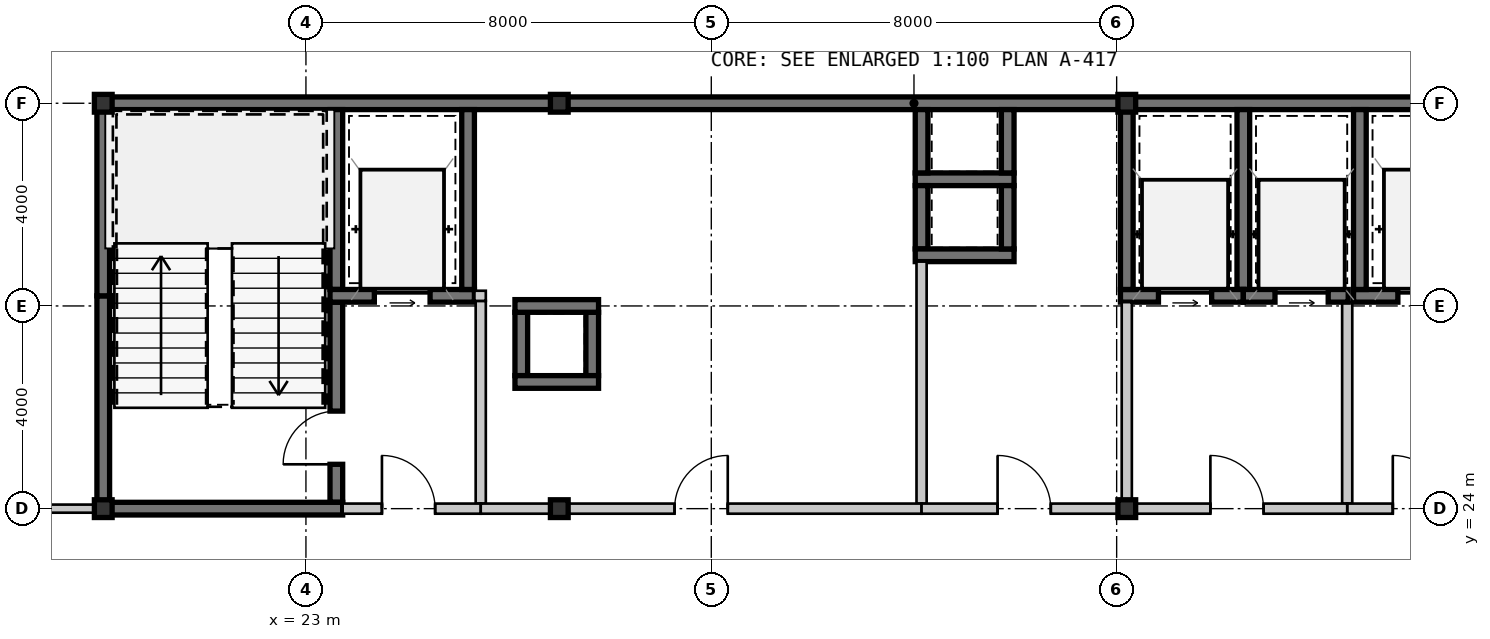
"""IFC4 building model, lengths in metres.
Left out: names, types, materials, properties, quantities, classifications, styles, units other than length and angle.
Written with IfcOpenShell. Run it as: python <this file> out.ifc"""

import sys

from ifc_helpers import new_model, si_unit, direction, frame, frame_2d, origin, origin_2d, place, context, subcontext, project, spatial, rectangle, hollow_rectangle, extrude, source, transform, mapped, element, fill, save


model = new_model("IFC4")
c1 = context("Model", 3, precision=1e-05, world=origin(), true_north=direction((0.0, 1.0)))
c2 = subcontext(c1, "Body", "Model", "MODEL_VIEW")
j1 = project(units=[si_unit("LENGTHUNIT", "METRE"), si_unit("PLANEANGLEUNIT", "RADIAN")], contexts=[c1])
p1 = place(None, origin())
s1 = spatial("IfcSite", under=j1, at=p1, CompositionType="ELEMENT")
p2 = place(p1, origin())
s2 = spatial("IfcBuilding", under=s1, at=p2, CompositionType="ELEMENT")
p3 = place(p2, frame((0.0, 0.0, 168.7)))
s3 = spatial("IfcBuildingStorey", under=s2, at=p3, CompositionType="ELEMENT", Elevation=168.7)
m1 = source(origin(), c2, "Body", "SweptSolid", [
    extrude(hollow_rectangle(XDim=0.35, YDim=0.35, WallThickness=0.016, at=origin_2d()), origin(), (0.0, 0.0, 1.0), 3.85),
])
for number, where, z_axis, x_axis in (
    (1, (19.0, 24.0, 0.0), (0.0, 0.0, 1.0), (1.0, 0.0, 0.0)),
    (2, (28.0, 24.0, 0.0), (0.0, 0.0, 1.0), (1.0, 0.0, 0.0)),
    (3, (39.2, 24.0, 0.0), (0.0, 0.0, 1.0), (1.0, 0.0, 0.0)),
    (4, (19.0, 32.0, 0.0), (0.0, 0.0, 1.0), (1.0, 0.0, 0.0)),
    (5, (28.0, 32.0, 0.0), (0.0, 0.0, 1.0), (1.0, 0.0, 0.0)),
    (6, (39.2, 32.0, 0.0), (0.0, 0.0, 1.0), (1.0, 0.0, 0.0)),
):
    element("IfcColumn", number, at=place(p3, frame(where, z_axis=z_axis, x_axis=x_axis)), inside=s3, PredefinedType="COLUMN", context=c2, shape_type="MappedRepresentation", body=[
        mapped(m1, transform((0.0, 0.0, 0.0), scale=1.0)),
    ])
m2 = source(origin(), c2, "Body", "SweptSolid", [
    extrude(rectangle(XDim=9.125, YDim=0.25, at=frame_2d((4.562, 0.0))), origin(), (0.0, 0.0, 1.0), 3.63),
])
p4 = place(p3, frame((18.875, 32.0, 0.0), z_axis=(0.0, 0.0, 1.0), x_axis=(1.0, 0.0, 0.0)))
e7 = element("IfcWall", 7, at=p4, inside=s3, PredefinedType="SHEAR", context=c2, shape_type="MappedRepresentation", body=[
    mapped(m2, transform((0.0, 0.0, 0.0), scale=1.0)),
])
m3 = source(origin(), c2, "Body", "SweptSolid", [
    extrude(rectangle(XDim=11.2, YDim=0.25, at=frame_2d((5.6, 0.0))), origin(), (0.0, 0.0, 1.0), 3.63),
])
p5 = place(p3, frame((28.0, 32.0, 0.0), z_axis=(0.0, 0.0, 1.0), x_axis=(1.0, 0.0, 0.0)))
e8 = element("IfcWall", 8, at=p5, inside=s3, PredefinedType="SHEAR", context=c2, shape_type="MappedRepresentation", body=[
    mapped(m3, transform((0.0, 0.0, 0.0), scale=1.0)),
])
m4 = source(origin(), c2, "Body", "SweptSolid", [
    extrude(rectangle(XDim=11.925, YDim=0.25, at=frame_2d((5.962, 0.0))), origin(), (0.0, 0.0, 1.0), 3.63),
])
p6 = place(p3, frame((39.2, 32.0, 0.0), z_axis=(0.0, 0.0, 1.0), x_axis=(1.0, 0.0, 0.0)))
e9 = element("IfcWall", 9, at=p6, inside=s3, PredefinedType="SHEAR", context=c2, shape_type="MappedRepresentation", body=[
    mapped(m4, transform((0.0, 0.0, 0.0), scale=1.0)),
])
m5 = source(origin(), c2, "Body", "SweptSolid", [
    extrude(rectangle(XDim=4.075, YDim=0.25, at=frame_2d((2.038, 0.0))), origin(), (0.0, 0.0, 1.0), 3.63),
])
p7 = place(p3, frame((19.0, 24.125, 0.0), z_axis=(0.0, 0.0, 1.0), x_axis=(0.0, 1.0, 0.0)))
e10 = element("IfcWall", 10, at=p7, inside=s3, PredefinedType="SHEAR", context=c2, shape_type="MappedRepresentation", body=[
    mapped(m5, transform((0.0, 0.0, 0.0), scale=1.0)),
])
m6 = source(origin(), c2, "Body", "SweptSolid", [
    extrude(rectangle(XDim=3.675, YDim=0.25, at=frame_2d((1.837, 0.0))), origin(), (0.0, 0.0, 1.0), 3.63),
])
p8 = place(p3, frame((19.0, 28.2, 0.0), z_axis=(0.0, 0.0, 1.0), x_axis=(0.0, 1.0, 0.0)))
e11 = element("IfcWall", 11, at=p8, inside=s3, PredefinedType="SHEAR", context=c2, shape_type="MappedRepresentation", body=[
    mapped(m6, transform((0.0, 0.0, 0.0), scale=1.0)),
])
m7 = source(origin(), c2, "Body", "SweptSolid", [
    extrude(rectangle(XDim=3.55, YDim=0.25, at=frame_2d((1.775, 0.0))), origin(), (0.0, 0.0, 1.0), 3.63),
])
p9 = place(p3, frame((23.6, 28.325, 0.0), z_axis=(0.0, 0.0, 1.0), x_axis=(0.0, 1.0, 0.0)))
e12 = element("IfcWall", 12, at=p9, inside=s3, PredefinedType="SHEAR", context=c2, shape_type="MappedRepresentation", body=[
    mapped(m7, transform((0.0, 0.0, 0.0), scale=1.0)),
])
m8 = source(origin(), c2, "Body", "SweptSolid", [
    extrude(rectangle(XDim=3.95, YDim=0.25, at=frame_2d((1.975, 0.0))), origin(), (0.0, 0.0, 1.0), 3.63),
])
p10 = place(p3, frame((23.6, 24.125, 0.0), z_axis=(0.0, 0.0, 1.0), x_axis=(0.0, 1.0, 0.0)))
e13 = element("IfcWall", 13, at=p10, inside=s3, PredefinedType="SHEAR", context=c2, shape_type="MappedRepresentation", body=[
    mapped(m8, transform((0.0, 0.0, 0.0), scale=1.0)),
])
m9 = source(origin(), c2, "Body", "SweptSolid", [
    extrude(rectangle(XDim=1.05, YDim=2.1, at=frame_2d((0.525, 1.05))), frame((0.0, 0.135, 0.0), z_axis=(0.0, -1.0, 0.0), x_axis=(1.0, 0.0, 0.0)), (0.0, 0.0, 1.0), 0.27),
])
p11 = place(p10, frame((0.75, 0.0, 0.0)))
e14 = element("IfcOpeningElement", 14, at=p11, cuts=e13, PredefinedType="OPENING", context=c2, shape_type="MappedRepresentation", body=[
    mapped(m9, transform((0.0, 0.0, 0.0), scale=1.0)),
])
m10 = source(origin(), c2, "Body", "SweptSolid", [
    extrude(rectangle(XDim=4.85, YDim=0.25, at=frame_2d((2.425, 0.0))), origin(), (0.0, 0.0, 1.0), 3.63),
])
p12 = place(p3, frame((18.875, 24.0, 0.0), z_axis=(0.0, 0.0, 1.0), x_axis=(1.0, 0.0, 0.0)))
e15 = element("IfcWall", 15, at=p12, inside=s3, PredefinedType="SHEAR", context=c2, shape_type="MappedRepresentation", body=[
    mapped(m10, transform((0.0, 0.0, 0.0), scale=1.0)),
])
m11 = source(origin(), c2, "Body", "SweptSolid", [
    extrude(rectangle(XDim=2.85, YDim=0.25, at=frame_2d((1.425, 0.0))), origin(), (0.0, 0.0, 1.0), 3.63),
])
p13 = place(p3, frame((23.475, 28.2, 0.0), z_axis=(0.0, 0.0, 1.0), x_axis=(1.0, 0.0, 0.0)))
e16 = element("IfcWall", 16, at=p13, inside=s3, PredefinedType="SHEAR", context=c2, shape_type="MappedRepresentation", body=[
    mapped(m11, transform((0.0, 0.0, 0.0), scale=1.0)),
])
m12 = source(origin(), c2, "Body", "SweptSolid", [
    extrude(rectangle(XDim=1.1, YDim=2.15, at=frame_2d((0.55, 1.075))), frame((0.0, 0.135, 0.0), z_axis=(0.0, -1.0, 0.0), x_axis=(1.0, 0.0, 0.0)), (0.0, 0.0, 1.0), 0.27),
])
p14 = place(p13, frame((0.875, 0.0, 0.0)))
e17 = element("IfcOpeningElement", 17, at=p14, cuts=e16, PredefinedType="OPENING", context=c2, shape_type="MappedRepresentation", body=[
    mapped(m12, transform((0.0, 0.0, 0.0), scale=1.0)),
])
p15 = place(p3, frame((26.2, 28.325, 0.0), z_axis=(0.0, 0.0, 1.0), x_axis=(0.0, 1.0, 0.0)))
e18 = element("IfcWall", 18, at=p15, inside=s3, PredefinedType="SHEAR", context=c2, shape_type="MappedRepresentation", body=[
    mapped(m7, transform((0.0, 0.0, 0.0), scale=1.0)),
])
m13 = source(origin(), c2, "Body", "SweptSolid", [
    extrude(rectangle(XDim=4.0, YDim=0.2, at=frame_2d((2.0, 0.0))), origin(), (0.0, 0.0, 1.0), 3.63),
])
p16 = place(p3, frame((26.45, 24.1, 0.0), z_axis=(0.0, 0.0, 1.0), x_axis=(0.0, 1.0, 0.0)))
e19 = element("IfcWall", 19, at=p16, inside=s3, PredefinedType="SOLIDWALL", context=c2, shape_type="MappedRepresentation", body=[
    mapped(m13, transform((0.0, 0.0, 0.0), scale=1.0)),
])
m14 = source(origin(), c2, "Body", "SweptSolid", [
    extrude(rectangle(XDim=2.725, YDim=0.2, at=frame_2d((1.362, 0.0))), origin(), (0.0, 0.0, 1.0), 3.17),
])
p17 = place(p3, frame((23.725, 24.0, 0.0), z_axis=(0.0, 0.0, 1.0), x_axis=(1.0, 0.0, 0.0)))
e20 = element("IfcWall", 20, at=p17, inside=s3, PredefinedType="SOLIDWALL", context=c2, shape_type="MappedRepresentation", body=[
    mapped(m14, transform((0.0, 0.0, 0.0), scale=1.0)),
])
m15 = source(origin(), c2, "Body", "SweptSolid", [
    extrude(rectangle(XDim=1.05, YDim=2.1, at=frame_2d((0.525, 1.05))), frame((0.0, 0.11, 0.0), z_axis=(0.0, -1.0, 0.0), x_axis=(1.0, 0.0, 0.0)), (0.0, 0.0, 1.0), 0.22),
])
p18 = place(p17, frame((0.775, 0.0, 0.0)))
e21 = element("IfcOpeningElement", 21, at=p18, cuts=e20, PredefinedType="OPENING", context=c2, shape_type="MappedRepresentation", body=[
    mapped(m15, transform((0.0, 0.0, 0.0), scale=1.0)),
])
p19 = place(p3, frame((43.675, 28.2, 0.0), z_axis=(0.0, 0.0, 1.0), x_axis=(1.0, 0.0, 0.0)))
e22 = element("IfcWall", 22, at=p19, inside=s3, PredefinedType="SHEAR", context=c2, shape_type="MappedRepresentation", body=[
    mapped(m11, transform((0.0, 0.0, 0.0), scale=1.0)),
])
p20 = place(p19, frame((0.875, 0.0, 0.0)))
e23 = element("IfcOpeningElement", 23, at=p20, cuts=e22, PredefinedType="OPENING", context=c2, shape_type="MappedRepresentation", body=[
    mapped(m12, transform((0.0, 0.0, 0.0), scale=1.0)),
])
p21 = place(p3, frame((43.8, 31.875, 0.0), z_axis=(0.0, 0.0, 1.0), x_axis=(0.0, -1.0, 0.0)))
e24 = element("IfcWall", 24, at=p21, inside=s3, PredefinedType="SHEAR", context=c2, shape_type="MappedRepresentation", body=[
    mapped(m7, transform((0.0, 0.0, 0.0), scale=1.0)),
])
m16 = source(origin(), c2, "Body", "SweptSolid", [
    extrude(rectangle(XDim=3.975, YDim=0.2, at=frame_2d((1.987, 0.0))), origin(), (0.0, 0.0, 1.0), 3.63),
])
p22 = place(p3, frame((43.55, 28.075, 0.0), z_axis=(0.0, 0.0, 1.0), x_axis=(0.0, -1.0, 0.0)))
e25 = element("IfcWall", 25, at=p22, inside=s3, PredefinedType="SOLIDWALL", context=c2, shape_type="MappedRepresentation", body=[
    mapped(m16, transform((0.0, 0.0, 0.0), scale=1.0)),
])
m17 = source(origin(), c2, "Body", "SweptSolid", [
    extrude(rectangle(XDim=2.725, YDim=0.2, at=frame_2d((1.362, 0.0))), origin(), (0.0, 0.0, 1.0), 3.097),
])
p23 = place(p3, frame((43.55, 24.0, 0.0), z_axis=(0.0, 0.0, 1.0), x_axis=(1.0, 0.0, 0.0)))
e26 = element("IfcWall", 26, at=p23, inside=s3, PredefinedType="SOLIDWALL", context=c2, shape_type="MappedRepresentation", body=[
    mapped(m17, transform((0.0, 0.0, 0.0), scale=1.0)),
])
p24 = place(p23, frame((0.9, 0.0, 0.0)))
e27 = element("IfcOpeningElement", 27, at=p24, cuts=e26, PredefinedType="OPENING", context=c2, shape_type="MappedRepresentation", body=[
    mapped(m15, transform((0.0, 0.0, 0.0), scale=1.0)),
])
m18 = source(origin(), c2, "Body", "SweptSolid", [
    extrude(rectangle(XDim=1.95, YDim=0.25, at=frame_2d((0.975, 0.0))), origin(), (0.0, 0.0, 1.0), 3.63),
])
p25 = place(p3, frame((35.025, 30.5, 0.0), z_axis=(0.0, 0.0, 1.0), x_axis=(1.0, 0.0, 0.0)))
e28 = element("IfcWall", 28, at=p25, inside=s3, PredefinedType="SHEAR", context=c2, shape_type="MappedRepresentation", body=[
    mapped(m18, transform((0.0, 0.0, 0.0), scale=1.0)),
])
m19 = source(origin(), c2, "Body", "SweptSolid", [
    extrude(rectangle(XDim=1.25, YDim=0.25, at=frame_2d((0.625, 0.0))), origin(), (0.0, 0.0, 1.0), 3.63),
])
for number, where, z_axis, x_axis in (
    (29, (35.15, 31.875, 0.0), (0.0, 0.0, 1.0), (0.0, -1.0, 0.0)),
    (30, (36.85, 30.625, 0.0), (0.0, 0.0, 1.0), (0.0, 1.0, 0.0)),
    (31, (35.15, 30.375, 0.0), (0.0, 0.0, 1.0), (0.0, -1.0, 0.0)),
):
    element("IfcWall", number, at=place(p3, frame(where, z_axis=z_axis, x_axis=x_axis)), inside=s3, PredefinedType="SHEAR", context=c2, shape_type="MappedRepresentation", body=[
        mapped(m19, transform((0.0, 0.0, 0.0), scale=1.0)),
    ])
p26 = place(p3, frame((35.025, 29.0, 0.0), z_axis=(0.0, 0.0, 1.0), x_axis=(1.0, 0.0, 0.0)))
e32 = element("IfcWall", 32, at=p26, inside=s3, PredefinedType="SHEAR", context=c2, shape_type="MappedRepresentation", body=[
    mapped(m18, transform((0.0, 0.0, 0.0), scale=1.0)),
])
for number, where, z_axis, x_axis in (
    (33, (36.85, 29.125, 0.0), (0.0, 0.0, 1.0), (0.0, 1.0, 0.0)),
    (34, (28.65, 26.625, 0.0), (0.0, 0.0, 1.0), (0.0, 1.0, 0.0)),
    (35, (27.25, 27.875, 0.0), (0.0, 0.0, 1.0), (0.0, -1.0, 0.0)),
):
    element("IfcWall", number, at=place(p3, frame(where, z_axis=z_axis, x_axis=x_axis)), inside=s3, PredefinedType="SHEAR", context=c2, shape_type="MappedRepresentation", body=[
        mapped(m19, transform((0.0, 0.0, 0.0), scale=1.0)),
    ])
m20 = source(origin(), c2, "Body", "SweptSolid", [
    extrude(rectangle(XDim=1.65, YDim=0.25, at=frame_2d((0.825, 0.0))), origin(), (0.0, 0.0, 1.0), 3.63),
])
for number, where, z_axis, x_axis in (
    (36, (28.775, 28.0, 0.0), (0.0, 0.0, 1.0), (-1.0, 0.0, 0.0)),
    (37, (27.125, 26.5, 0.0), (0.0, 0.0, 1.0), (1.0, 0.0, 0.0)),
):
    element("IfcWall", number, at=place(p3, frame(where, z_axis=z_axis, x_axis=x_axis)), inside=s3, PredefinedType="SHEAR", context=c2, shape_type="MappedRepresentation", body=[
        mapped(m20, transform((0.0, 0.0, 0.0), scale=1.0)),
    ])
p27 = place(p3, frame((41.5, 28.325, 0.0), z_axis=(0.0, 0.0, 1.0), x_axis=(0.0, 1.0, 0.0)))
e38 = element("IfcWall", 38, at=p27, inside=s3, PredefinedType="SHEAR", context=c2, shape_type="MappedRepresentation", body=[
    mapped(m7, transform((0.0, 0.0, 0.0), scale=1.0)),
])
m21 = source(origin(), c2, "Body", "SweptSolid", [
    extrude(rectangle(XDim=2.425, YDim=0.25, at=frame_2d((1.212, 0.0))), origin(), (0.0, 0.0, 1.0), 3.63),
])
p28 = place(p3, frame((39.075, 28.2, 0.0), z_axis=(0.0, 0.0, 1.0), x_axis=(1.0, 0.0, 0.0)))
e39 = element("IfcWall", 39, at=p28, inside=s3, PredefinedType="SHEAR", context=c2, shape_type="MappedRepresentation", body=[
    mapped(m21, transform((0.0, 0.0, 0.0), scale=1.0)),
])
m22 = source(origin(), c2, "Body", "SweptSolid", [
    extrude(rectangle(XDim=1.05, YDim=2.15, at=frame_2d((0.525, 1.075))), frame((0.0, 0.135, 0.0), z_axis=(0.0, -1.0, 0.0), x_axis=(1.0, 0.0, 0.0)), (0.0, 0.0, 1.0), 0.27),
])
p29 = place(p28, frame((0.75, 0.0, 0.0)))
e40 = element("IfcOpeningElement", 40, at=p29, cuts=e39, PredefinedType="OPENING", context=c2, shape_type="MappedRepresentation", body=[
    mapped(m22, transform((0.0, 0.0, 0.0), scale=1.0)),
])
p30 = place(p3, frame((39.2, 31.875, 0.0), z_axis=(0.0, 0.0, 1.0), x_axis=(0.0, -1.0, 0.0)))
e41 = element("IfcWall", 41, at=p30, inside=s3, PredefinedType="SHEAR", context=c2, shape_type="MappedRepresentation", body=[
    mapped(m7, transform((0.0, 0.0, 0.0), scale=1.0)),
])
m23 = source(origin(), c2, "Body", "SweptSolid", [
    extrude(rectangle(XDim=2.07, YDim=0.25, at=frame_2d((1.035, 0.0))), origin(), (0.0, 0.0, 1.0), 3.63),
])
p31 = place(p3, frame((41.5, 28.2, 0.0), z_axis=(0.0, 0.0, 1.0), x_axis=(1.0, 0.0, 0.0)))
e42 = element("IfcWall", 42, at=p31, inside=s3, PredefinedType="SHEAR", context=c2, shape_type="MappedRepresentation", body=[
    mapped(m23, transform((0.0, 0.0, 0.0), scale=1.0)),
])
p32 = place(p31, frame((0.625, 0.0, 0.0)))
e43 = element("IfcOpeningElement", 43, at=p32, cuts=e42, PredefinedType="OPENING", context=c2, shape_type="MappedRepresentation", body=[
    mapped(m22, transform((0.0, 0.0, 0.0), scale=1.0)),
])
m24 = source(origin(), c2, "Body", "SweptSolid", [
    extrude(rectangle(XDim=3.975, YDim=0.2, at=frame_2d((1.987, 0.0))), origin(), (0.0, 0.0, 1.0), 3.17),
])
p33 = place(p3, frame((39.2, 24.1, 0.0), z_axis=(0.0, 0.0, 1.0), x_axis=(0.0, 1.0, 0.0)))
e44 = element("IfcWall", 44, at=p33, inside=s3, PredefinedType="SOLIDWALL", context=c2, shape_type="MappedRepresentation", body=[
    mapped(m24, transform((0.0, 0.0, 0.0), scale=1.0)),
])
m25 = source(origin(), c2, "Body", "SweptSolid", [
    extrude(rectangle(XDim=4.35, YDim=0.2, at=frame_2d((2.175, 0.0))), origin(), (0.0, 0.0, 1.0), 3.097),
])
p34 = place(p3, frame((43.55, 24.0, 0.0), z_axis=(0.0, 0.0, 1.0), x_axis=(-1.0, 0.0, 0.0)))
e45 = element("IfcWall", 45, at=p34, inside=s3, PredefinedType="SOLIDWALL", context=c2, shape_type="MappedRepresentation", body=[
    mapped(m25, transform((0.0, 0.0, 0.0), scale=1.0)),
])
p35 = place(p34, frame((1.65, 0.0, 0.0)))
e46 = element("IfcOpeningElement", 46, at=p35, cuts=e45, PredefinedType="OPENING", context=c2, shape_type="MappedRepresentation", body=[
    mapped(m15, transform((0.0, 0.0, 0.0), scale=1.0)),
])
m26 = source(origin(), c2, "Body", "SweptSolid", [
    extrude(rectangle(XDim=4.775, YDim=0.2, at=frame_2d((2.387, 0.0))), origin(), (0.0, 0.0, 1.0), 3.63),
])
p36 = place(p3, frame((35.15, 28.875, 0.0), z_axis=(0.0, 0.0, 1.0), x_axis=(0.0, -1.0, 0.0)))
e47 = element("IfcWall", 47, at=p36, inside=s3, PredefinedType="SOLIDWALL", context=c2, shape_type="MappedRepresentation", body=[
    mapped(m26, transform((0.0, 0.0, 0.0), scale=1.0)),
])
m27 = source(origin(), c2, "Body", "SweptSolid", [
    extrude(rectangle(XDim=8.7, YDim=0.2, at=frame_2d((4.35, 0.0))), origin(), (0.0, 0.0, 1.0), 3.17),
])
p37 = place(p3, frame((35.15, 24.0, 0.0), z_axis=(0.0, 0.0, 1.0), x_axis=(-1.0, 0.0, 0.0)))
e48 = element("IfcWall", 48, at=p37, inside=s3, PredefinedType="SOLIDWALL", context=c2, shape_type="MappedRepresentation", body=[
    mapped(m27, transform((0.0, 0.0, 0.0), scale=1.0)),
])
p38 = place(p37, frame((3.825, 0.0, 0.0)))
e49 = element("IfcOpeningElement", 49, at=p38, cuts=e48, PredefinedType="OPENING", context=c2, shape_type="MappedRepresentation", body=[
    mapped(m15, transform((0.0, 0.0, 0.0), scale=1.0)),
])
m28 = source(origin(), c2, "Body", "SweptSolid", [
    extrude(rectangle(XDim=4.05, YDim=0.2, at=frame_2d((2.025, 0.0))), origin(), (0.0, 0.0, 1.0), 3.17),
])
p39 = place(p3, frame((39.2, 24.0, 0.0), z_axis=(0.0, 0.0, 1.0), x_axis=(-1.0, 0.0, 0.0)))
e50 = element("IfcWall", 50, at=p39, inside=s3, PredefinedType="SOLIDWALL", context=c2, shape_type="MappedRepresentation", body=[
    mapped(m28, transform((0.0, 0.0, 0.0), scale=1.0)),
])
p40 = place(p39, frame((1.5, 0.0, 0.0)))
e51 = element("IfcOpeningElement", 51, at=p40, cuts=e50, PredefinedType="OPENING", context=c2, shape_type="MappedRepresentation", body=[
    mapped(m15, transform((0.0, 0.0, 0.0), scale=1.0)),
])
m29 = source(origin(), c2, "Body", "SweptSolid", [
    extrude(rectangle(XDim=6.251, YDim=0.16, at=frame_2d((3.125, 0.0))), origin(), (0.0, 0.0, 1.0), 3.63),
])
p41 = place(p3, frame((12.624, 24.0, 0.0), z_axis=(0.0, 0.0, 1.0), x_axis=(1.0, 0.0, 0.0)))
e52 = element("IfcWall", 52, at=p41, inside=s3, PredefinedType="PARTITIONING", context=c2, shape_type="MappedRepresentation", body=[
    mapped(m29, transform((0.0, 0.0, 0.0), scale=1.0)),
])
m30 = source(origin(), c2, "Body", "SweptSolid", [
    extrude(rectangle(XDim=0.225, YDim=0.2, at=frame_2d((0.113, 0.0))), origin(), (0.0, 0.0, 1.0), 3.63),
])
p42 = place(p3, frame((26.325, 28.2, 0.0), z_axis=(0.0, 0.0, 1.0), x_axis=(1.0, 0.0, 0.0)))
e53 = element("IfcWall", 53, at=p42, inside=s3, PredefinedType="SOLIDWALL", context=c2, shape_type="MappedRepresentation", body=[
    mapped(m30, transform((0.0, 0.0, 0.0), scale=1.0)),
])
m31 = source(origin(), c2, "Body", "SweptSolid", [
    extrude(rectangle(XDim=1.05, YDim=2.1, at=frame_2d((0.525, 1.05))), frame((0.0, 0.025, 0.0), z_axis=(0.0, -1.0, 0.0), x_axis=(1.0, 0.0, 0.0)), (0.0, 0.0, 1.0), 0.05),
])
p43 = place(p11, origin())
e54 = element("IfcDoor", 54, at=p43, inside=s3, OperationType="SINGLE_SWING_LEFT", PredefinedType="DOOR", context=c2, shape_type="MappedRepresentation", body=[
    mapped(m31, transform((0.0, 0.0, 0.0), scale=1.0)),
])
fill(e14, e54)
m32 = source(origin(), c2, "Body", "SweptSolid", [
    extrude(rectangle(XDim=1.1, YDim=2.15, at=frame_2d((0.55, 1.075))), frame((0.0, 0.025, 0.0), z_axis=(0.0, -1.0, 0.0), x_axis=(1.0, 0.0, 0.0)), (0.0, 0.0, 1.0), 0.05),
])
p44 = place(p14, origin())
e55 = element("IfcDoor", 55, at=p44, inside=s3, OperationType="SLIDING_TO_LEFT", PredefinedType="DOOR", context=c2, shape_type="MappedRepresentation", body=[
    mapped(m32, transform((0.0, 0.0, 0.0), scale=1.0)),
])
fill(e17, e55)
p45 = place(p18, origin())
e56 = element("IfcDoor", 56, at=p45, inside=s3, OperationType="SINGLE_SWING_LEFT", PredefinedType="DOOR", context=c2, shape_type="MappedRepresentation", body=[
    mapped(m31, transform((0.0, 0.0, 0.0), scale=1.0)),
])
fill(e21, e56)
p46 = place(p20, origin())
e57 = element("IfcDoor", 57, at=p46, inside=s3, OperationType="SLIDING_TO_LEFT", PredefinedType="DOOR", context=c2, shape_type="MappedRepresentation", body=[
    mapped(m32, transform((0.0, 0.0, 0.0), scale=1.0)),
])
fill(e23, e57)
p47 = place(p24, origin())
e58 = element("IfcDoor", 58, at=p47, inside=s3, OperationType="SINGLE_SWING_LEFT", PredefinedType="DOOR", context=c2, shape_type="MappedRepresentation", body=[
    mapped(m31, transform((0.0, 0.0, 0.0), scale=1.0)),
])
fill(e27, e58)
m33 = source(origin(), c2, "Body", "SweptSolid", [
    extrude(rectangle(XDim=1.05, YDim=2.15, at=frame_2d((0.525, 1.075))), frame((0.0, 0.025, 0.0), z_axis=(0.0, -1.0, 0.0), x_axis=(1.0, 0.0, 0.0)), (0.0, 0.0, 1.0), 0.05),
])
p48 = place(p29, origin())
e59 = element("IfcDoor", 59, at=p48, inside=s3, OperationType="SLIDING_TO_LEFT", PredefinedType="DOOR", context=c2, shape_type="MappedRepresentation", body=[
    mapped(m33, transform((0.0, 0.0, 0.0), scale=1.0)),
])
fill(e40, e59)
p49 = place(p32, origin())
e60 = element("IfcDoor", 60, at=p49, inside=s3, OperationType="SLIDING_TO_LEFT", PredefinedType="DOOR", context=c2, shape_type="MappedRepresentation", body=[
    mapped(m33, transform((0.0, 0.0, 0.0), scale=1.0)),
])
fill(e43, e60)
p50 = place(p35, frame((1.05, 0.0, 0.0), z_axis=(0.0, 0.0, 1.0), x_axis=(-1.0, 0.0, 0.0)))
e61 = element("IfcDoor", 61, at=p50, inside=s3, OperationType="SINGLE_SWING_LEFT", PredefinedType="DOOR", context=c2, shape_type="MappedRepresentation", body=[
    mapped(m31, transform((0.0, 0.0, 0.0), scale=1.0)),
])
fill(e46, e61)
p51 = place(p38, frame((1.05, 0.0, 0.0), z_axis=(0.0, 0.0, 1.0), x_axis=(-1.0, 0.0, 0.0)))
e62 = element("IfcDoor", 62, at=p51, inside=s3, OperationType="SINGLE_SWING_RIGHT", PredefinedType="DOOR", context=c2, shape_type="MappedRepresentation", body=[
    mapped(m31, transform((0.0, 0.0, 0.0), scale=1.0)),
])
fill(e49, e62)
p52 = place(p40, frame((1.05, 0.0, 0.0), z_axis=(0.0, 0.0, 1.0), x_axis=(-1.0, 0.0, 0.0)))
e63 = element("IfcDoor", 63, at=p52, inside=s3, OperationType="SINGLE_SWING_LEFT", PredefinedType="DOOR", context=c2, shape_type="MappedRepresentation", body=[
    mapped(m31, transform((0.0, 0.0, 0.0), scale=1.0)),
])
fill(e51, e63)
save(model, sys.argv[1])
